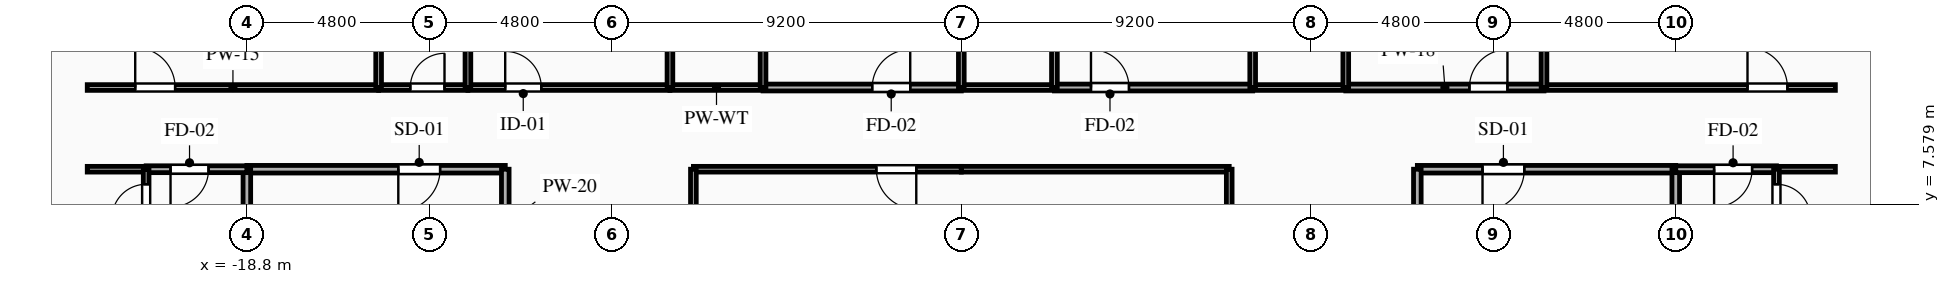
"""IFC4 building model, lengths in metres.
Left out: names, types, materials, properties, quantities, classifications, styles, units other than length and angle.
Written with IfcOpenShell. Run it as: python <this file> out.ifc"""

import sys

from ifc_helpers import new_model, si_unit, direction, frame, frame_2d, origin, place, context, subcontext, project, spatial, rectangle, extrude, element, fill, save


model = new_model("IFC4")
c1 = context("Model", 3, precision=1e-05, world=origin(), true_north=direction((0.0, 1.0)))
c2 = subcontext(c1, "Body", "Model", "MODEL_VIEW")
j1 = project(units=[si_unit("LENGTHUNIT", "METRE"), si_unit("PLANEANGLEUNIT", "RADIAN")], contexts=[c1])
p1 = place(None, origin())
s1 = spatial("IfcSite", under=j1, at=p1, CompositionType="ELEMENT")
p2 = place(p1, origin())
s2 = spatial("IfcBuilding", under=s1, at=p2, CompositionType="ELEMENT")
p3 = place(p2, frame((0.0, 0.0, 50.45)))
s3 = spatial("IfcBuildingStorey", under=s2, at=p3, CompositionType="ELEMENT", Elevation=50.45)
p4 = place(p3, frame((-12.0, 8.5, 0.0), z_axis=(0.0, 0.0, 1.0), x_axis=(-1.0, 0.0, 0.0)))
e1 = element("IfcWall", 1, at=p4, inside=s3, PredefinedType="PARTITIONING", context=c2, shape_type="SweptSolid", body=[
    extrude(rectangle(XDim=6.8, YDim=0.2, at=frame_2d((3.4, 0.0))), origin(), (0.0, 0.0, 1.0), 3.035),
])
p5 = place(p4, frame((1.715, 0.0, 0.0)))
e2 = element("IfcOpeningElement", 2, at=p5, cuts=e1, PredefinedType="OPENING", context=c2, shape_type="SweptSolid", body=[
    extrude(rectangle(XDim=1.1, YDim=2.15, at=frame_2d((0.55, 1.075))), frame((0.0, 0.11, 0.0), z_axis=(0.0, -1.0, 0.0), x_axis=(1.0, 0.0, 0.0)), (0.0, 0.0, 1.0), 0.22),
])
p6 = place(p3, frame((-12.0, 5.6, 0.0), z_axis=(0.0, 0.0, 1.0), x_axis=(0.0, 1.0, 0.0)))
e3 = element("IfcWall", 3, at=p6, inside=s3, PredefinedType="PARTITIONING", context=c2, shape_type="SweptSolid", body=[
    extrude(rectangle(XDim=2.9, YDim=0.2, at=frame_2d((1.45, 0.0))), origin(), (0.0, 0.0, 1.0), 3.035),
])
p7 = place(p3, frame((-18.8, 8.5, 0.0), z_axis=(0.0, 0.0, 1.0), x_axis=(0.0, -1.0, 0.0)))
e4 = element("IfcWall", 4, at=p7, inside=s3, PredefinedType="PARTITIONING", context=c2, shape_type="SweptSolid", body=[
    extrude(rectangle(XDim=2.9, YDim=0.2, at=frame_2d((1.45, 0.0))), origin(), (0.0, 0.0, 1.0), 2.52),
])
p8 = place(p3, frame((18.8, 8.5, 0.0), z_axis=(0.0, 0.0, 1.0), x_axis=(-1.0, 0.0, 0.0)))
e5 = element("IfcWall", 5, at=p8, inside=s3, PredefinedType="PARTITIONING", context=c2, shape_type="SweptSolid", body=[
    extrude(rectangle(XDim=6.8, YDim=0.2, at=frame_2d((3.4, 0.0))), origin(), (0.0, 0.0, 1.0), 3.035),
])
p9 = place(p8, frame((3.985, 0.0, 0.0)))
e6 = element("IfcOpeningElement", 6, at=p9, cuts=e5, PredefinedType="OPENING", context=c2, shape_type="SweptSolid", body=[
    extrude(rectangle(XDim=1.1, YDim=2.15, at=frame_2d((0.55, 1.075))), frame((0.0, 0.11, 0.0), z_axis=(0.0, -1.0, 0.0), x_axis=(1.0, 0.0, 0.0)), (0.0, 0.0, 1.0), 0.22),
])
p10 = place(p3, frame((12.0, 8.5, 0.0), z_axis=(0.0, 0.0, 1.0), x_axis=(0.0, -1.0, 0.0)))
e7 = element("IfcWall", 7, at=p10, inside=s3, PredefinedType="PARTITIONING", context=c2, shape_type="SweptSolid", body=[
    extrude(rectangle(XDim=2.9, YDim=0.2, at=frame_2d((1.45, 0.0))), origin(), (0.0, 0.0, 1.0), 3.035),
])
p11 = place(p3, frame((18.8, 5.6, 0.0), z_axis=(0.0, 0.0, 1.0), x_axis=(0.0, 1.0, 0.0)))
e8 = element("IfcWall", 8, at=p11, inside=s3, PredefinedType="PARTITIONING", context=c2, shape_type="SweptSolid", body=[
    extrude(rectangle(XDim=2.9, YDim=0.2, at=frame_2d((1.45, 0.0))), origin(), (0.0, 0.0, 1.0), 2.52),
])
p12 = place(p3, frame((-18.8, 8.5, 0.0), z_axis=(0.0, 0.0, 1.0), x_axis=(-1.0, 0.0, 0.0)))
e9 = element("IfcWall", 9, at=p12, inside=s3, PredefinedType="PARTITIONING", context=c2, shape_type="SweptSolid", body=[
    extrude(rectangle(XDim=2.65, YDim=0.18, at=frame_2d((1.325, 0.0))), origin(), (0.0, 0.0, 1.0), 3.035),
])
p13 = place(p12, frame((1.009, 0.0, 0.0)))
e10 = element("IfcOpeningElement", 10, at=p13, cuts=e9, PredefinedType="OPENING", context=c2, shape_type="SweptSolid", body=[
    extrude(rectangle(XDim=1.0, YDim=2.15, at=frame_2d((0.5, 1.075))), frame((0.0, 0.1, 0.0), z_axis=(0.0, -1.0, 0.0), x_axis=(1.0, 0.0, 0.0)), (0.0, 0.0, 1.0), 0.2),
])
p14 = place(p3, frame((-21.45, 8.5, 0.0), z_axis=(0.0, 0.0, 1.0), x_axis=(-1.0, 0.0, 0.0)))
e11 = element("IfcWall", 11, at=p14, inside=s3, PredefinedType="PARTITIONING", context=c2, shape_type="SweptSolid", body=[
    extrude(rectangle(XDim=1.55, YDim=0.15, at=frame_2d((0.775, 0.0))), origin(), (0.0, 0.0, 1.0), 3.035),
])
p15 = place(p3, frame((-23.0, 10.65, 0.0), z_axis=(0.0, 0.0, 1.0), x_axis=(1.0, 0.0, 0.0)))
e12 = element("IfcWall", 12, at=p15, inside=s3, PredefinedType="PARTITIONING", context=c2, shape_type="SweptSolid", body=[
    extrude(rectangle(XDim=7.667, YDim=0.15, at=frame_2d((3.833, 0.0))), origin(), (0.0, 0.0, 1.0), 3.035),
])
p16 = place(p15, frame((1.262, 0.0, 0.0)))
e13 = element("IfcOpeningElement", 13, at=p16, cuts=e12, PredefinedType="OPENING", context=c2, shape_type="SweptSolid", body=[
    extrude(rectangle(XDim=1.05, YDim=2.15, at=frame_2d((0.525, 1.075))), frame((0.0, 0.085, 0.0), z_axis=(0.0, -1.0, 0.0), x_axis=(1.0, 0.0, 0.0)), (0.0, 0.0, 1.0), 0.17),
])
p17 = place(p3, frame((-15.333, 10.65, 0.0), z_axis=(0.0, 0.0, 1.0), x_axis=(1.0, 0.0, 0.0)))
e14 = element("IfcWall", 14, at=p17, inside=s3, PredefinedType="PLUMBINGWALL", context=c2, shape_type="SweptSolid", body=[
    extrude(rectangle(XDim=2.35, YDim=0.15, at=frame_2d((1.175, 0.0))), origin(), (0.0, 0.0, 1.0), 3.035),
])
p18 = place(p17, frame((0.834, 0.0, 0.0)))
e15 = element("IfcOpeningElement", 15, at=p18, cuts=e14, PredefinedType="OPENING", context=c2, shape_type="SweptSolid", body=[
    extrude(rectangle(XDim=0.9, YDim=2.1, at=frame_2d((0.45, 1.05))), frame((0.0, 0.085, 0.0), z_axis=(0.0, -1.0, 0.0), x_axis=(1.0, 0.0, 0.0)), (0.0, 0.0, 1.0), 0.17),
])
p19 = place(p3, frame((-12.983, 10.65, 0.0), z_axis=(0.0, 0.0, 1.0), x_axis=(1.0, 0.0, 0.0)))
e16 = element("IfcWall", 16, at=p19, inside=s3, PredefinedType="PARTITIONING", context=c2, shape_type="SweptSolid", body=[
    extrude(rectangle(XDim=5.316, YDim=0.15, at=frame_2d((2.658, 0.0))), origin(), (0.0, 0.0, 1.0), 3.035),
])
p20 = place(p19, frame((0.981, 0.0, 0.0)))
e17 = element("IfcOpeningElement", 17, at=p20, cuts=e16, PredefinedType="OPENING", context=c2, shape_type="SweptSolid", body=[
    extrude(rectangle(XDim=0.95, YDim=2.1, at=frame_2d((0.475, 1.05))), frame((0.0, 0.085, 0.0), z_axis=(0.0, -1.0, 0.0), x_axis=(1.0, 0.0, 0.0)), (0.0, 0.0, 1.0), 0.17),
])
p21 = place(p3, frame((-5.217, 10.65, 0.0), z_axis=(0.0, 0.0, 1.0), x_axis=(1.0, 0.0, 0.0)))
e18 = element("IfcWall", 18, at=p21, inside=s3, PredefinedType="PARTITIONING", context=c2, shape_type="SweptSolid", body=[
    extrude(rectangle(XDim=5.217, YDim=0.18, at=frame_2d((2.608, 0.0))), origin(), (0.0, 0.0, 1.0), 3.035),
])
p22 = place(p21, frame((2.873, 0.0, 0.0)))
e19 = element("IfcOpeningElement", 19, at=p22, cuts=e18, PredefinedType="OPENING", context=c2, shape_type="SweptSolid", body=[
    extrude(rectangle(XDim=1.0, YDim=2.15, at=frame_2d((0.5, 1.075))), frame((0.0, 0.1, 0.0), z_axis=(0.0, -1.0, 0.0), x_axis=(1.0, 0.0, 0.0)), (0.0, 0.0, 1.0), 0.2),
])
p23 = place(p3, frame((-7.667, 10.65, 0.0), z_axis=(0.0, 0.0, 1.0), x_axis=(1.0, 0.0, 0.0)))
e20 = element("IfcWall", 20, at=p23, inside=s3, PredefinedType="PLUMBINGWALL", context=c2, shape_type="SweptSolid", body=[
    extrude(rectangle(XDim=2.45, YDim=0.15, at=frame_2d((1.225, 0.0))), origin(), (0.0, 0.0, 1.0), 3.035),
])
p24 = place(p3, frame((0.0, 8.5, 0.0), z_axis=(0.0, 0.0, 1.0), x_axis=(-1.0, 0.0, 0.0)))
e21 = element("IfcWall", 21, at=p24, inside=s3, PredefinedType="PARTITIONING", context=c2, shape_type="SweptSolid", body=[
    extrude(rectangle(XDim=7.05, YDim=0.15, at=frame_2d((3.525, 0.0))), origin(), (0.0, 0.0, 1.0), 3.035),
])
p25 = place(p24, frame((1.185, 0.0, 0.0)))
e22 = element("IfcOpeningElement", 22, at=p25, cuts=e21, PredefinedType="OPENING", context=c2, shape_type="SweptSolid", body=[
    extrude(rectangle(XDim=1.05, YDim=2.15, at=frame_2d((0.525, 1.075))), frame((0.0, 0.085, 0.0), z_axis=(0.0, -1.0, 0.0), x_axis=(1.0, 0.0, 0.0)), (0.0, 0.0, 1.0), 0.17),
])
p26 = place(p3, frame((21.45, 8.5, 0.0), z_axis=(0.0, 0.0, 1.0), x_axis=(-1.0, 0.0, 0.0)))
e23 = element("IfcWall", 23, at=p26, inside=s3, PredefinedType="PARTITIONING", context=c2, shape_type="SweptSolid", body=[
    extrude(rectangle(XDim=2.65, YDim=0.18, at=frame_2d((1.325, 0.0))), origin(), (0.0, 0.0, 1.0), 3.035),
])
p27 = place(p26, frame((0.641, 0.0, 0.0)))
e24 = element("IfcOpeningElement", 24, at=p27, cuts=e23, PredefinedType="OPENING", context=c2, shape_type="SweptSolid", body=[
    extrude(rectangle(XDim=1.0, YDim=2.15, at=frame_2d((0.5, 1.075))), frame((0.0, 0.1, 0.0), z_axis=(0.0, -1.0, 0.0), x_axis=(1.0, 0.0, 0.0)), (0.0, 0.0, 1.0), 0.2),
])
p28 = place(p3, frame((23.0, 8.5, 0.0), z_axis=(0.0, 0.0, 1.0), x_axis=(-1.0, 0.0, 0.0)))
e25 = element("IfcWall", 25, at=p28, inside=s3, PredefinedType="PARTITIONING", context=c2, shape_type="SweptSolid", body=[
    extrude(rectangle(XDim=1.55, YDim=0.15, at=frame_2d((0.775, 0.0))), origin(), (0.0, 0.0, 1.0), 3.035),
])
p29 = place(p3, frame((2.45, 10.65, 0.0), z_axis=(0.0, 0.0, 1.0), x_axis=(1.0, 0.0, 0.0)))
e26 = element("IfcWall", 26, at=p29, inside=s3, PredefinedType="PARTITIONING", context=c2, shape_type="SweptSolid", body=[
    extrude(rectangle(XDim=5.217, YDim=0.18, at=frame_2d((2.608, 0.0))), origin(), (0.0, 0.0, 1.0), 3.035),
])
p30 = place(p29, frame((0.962, 0.0, 0.0)))
e27 = element("IfcOpeningElement", 27, at=p30, cuts=e26, PredefinedType="OPENING", context=c2, shape_type="SweptSolid", body=[
    extrude(rectangle(XDim=1.0, YDim=2.15, at=frame_2d((0.5, 1.075))), frame((0.0, 0.1, 0.0), z_axis=(0.0, -1.0, 0.0), x_axis=(1.0, 0.0, 0.0)), (0.0, 0.0, 1.0), 0.2),
])
p31 = place(p3, frame((0.0, 10.65, 0.0), z_axis=(0.0, 0.0, 1.0), x_axis=(1.0, 0.0, 0.0)))
e28 = element("IfcWall", 28, at=p31, inside=s3, PredefinedType="PLUMBINGWALL", context=c2, shape_type="SweptSolid", body=[
    extrude(rectangle(XDim=2.45, YDim=0.15, at=frame_2d((1.225, 0.0))), origin(), (0.0, 0.0, 1.0), 3.035),
])
p32 = place(p3, frame((10.117, 10.65, 0.0), z_axis=(0.0, 0.0, 1.0), x_axis=(1.0, 0.0, 0.0)))
e29 = element("IfcWall", 29, at=p32, inside=s3, PredefinedType="PARTITIONING", context=c2, shape_type="SweptSolid", body=[
    extrude(rectangle(XDim=5.216, YDim=0.18, at=frame_2d((2.608, 0.0))), origin(), (0.0, 0.0, 1.0), 3.035),
])
p33 = place(p32, frame((3.254, 0.0, 0.0)))
e30 = element("IfcOpeningElement", 30, at=p33, cuts=e29, PredefinedType="OPENING", context=c2, shape_type="SweptSolid", body=[
    extrude(rectangle(XDim=1.0, YDim=2.15, at=frame_2d((0.5, 1.075))), frame((0.0, 0.1, 0.0), z_axis=(0.0, -1.0, 0.0), x_axis=(1.0, 0.0, 0.0)), (0.0, 0.0, 1.0), 0.2),
])
p34 = place(p3, frame((7.667, 10.65, 0.0), z_axis=(0.0, 0.0, 1.0), x_axis=(1.0, 0.0, 0.0)))
e31 = element("IfcWall", 31, at=p34, inside=s3, PredefinedType="PLUMBINGWALL", context=c2, shape_type="SweptSolid", body=[
    extrude(rectangle(XDim=2.45, YDim=0.15, at=frame_2d((1.225, 0.0))), origin(), (0.0, 0.0, 1.0), 3.035),
])
p35 = place(p3, frame((15.333, 10.65, 0.0), z_axis=(0.0, 0.0, 1.0), x_axis=(1.0, 0.0, 0.0)))
e32 = element("IfcWall", 32, at=p35, inside=s3, PredefinedType="PARTITIONING", context=c2, shape_type="SweptSolid", body=[
    extrude(rectangle(XDim=7.667, YDim=0.15, at=frame_2d((3.833, 0.0))), origin(), (0.0, 0.0, 1.0), 3.035),
])
p36 = place(p35, frame((5.355, 0.0, 0.0)))
e33 = element("IfcOpeningElement", 33, at=p36, cuts=e32, PredefinedType="OPENING", context=c2, shape_type="SweptSolid", body=[
    extrude(rectangle(XDim=1.05, YDim=2.15, at=frame_2d((0.525, 1.075))), frame((0.0, 0.085, 0.0), z_axis=(0.0, -1.0, 0.0), x_axis=(1.0, 0.0, 0.0)), (0.0, 0.0, 1.0), 0.17),
])
for number, where, z_axis, x_axis in (
    (34, (7.05, 8.5, 0.0), (0.0, 0.0, 1.0), (-1.0, 0.0, 0.0)),
    (35, (-7.05, 8.5, 0.0), (0.0, 0.0, 1.0), (0.0, -1.0, 0.0)),
    (36, (7.05, 1.45, 0.0), (0.0, 0.0, 1.0), (0.0, 1.0, 0.0)),
):
    element("IfcWall", number, at=place(p3, frame(where, z_axis=z_axis, x_axis=x_axis)), inside=s3, PredefinedType="PARTITIONING", context=c2, shape_type="SweptSolid", body=[
        extrude(rectangle(XDim=7.05, YDim=0.15, at=frame_2d((3.525, 0.0))), origin(), (0.0, 0.0, 1.0), 3.035),
    ])
p37 = place(p3, frame((-21.45, 6.808, 0.0), z_axis=(0.0, 0.0, 1.0), x_axis=(0.0, 1.0, 0.0)))
e37 = element("IfcWall", 37, at=p37, inside=s3, PredefinedType="PARTITIONING", context=c2, shape_type="SweptSolid", body=[
    extrude(rectangle(XDim=1.692, YDim=0.15, at=frame_2d((0.846, 0.0))), origin(), (0.0, 0.0, 1.0), 3.035),
])
p38 = place(p37, frame((0.396, 0.0, 0.0)))
e38 = element("IfcOpeningElement", 38, at=p38, cuts=e37, PredefinedType="OPENING", context=c2, shape_type="SweptSolid", body=[
    extrude(rectangle(XDim=0.9, YDim=2.1, at=frame_2d((0.45, 1.05))), frame((0.0, 0.085, 0.0), z_axis=(0.0, -1.0, 0.0), x_axis=(1.0, 0.0, 0.0)), (0.0, 0.0, 1.0), 0.17),
])
p39 = place(p3, frame((21.45, 8.5, 0.0), z_axis=(0.0, 0.0, 1.0), x_axis=(0.0, -1.0, 0.0)))
e39 = element("IfcWall", 39, at=p39, inside=s3, PredefinedType="PARTITIONING", context=c2, shape_type="SweptSolid", body=[
    extrude(rectangle(XDim=1.692, YDim=0.15, at=frame_2d((0.846, 0.0))), origin(), (0.0, 0.0, 1.0), 3.035),
])
p40 = place(p39, frame((0.396, 0.0, 0.0)))
e40 = element("IfcOpeningElement", 40, at=p40, cuts=e39, PredefinedType="OPENING", context=c2, shape_type="SweptSolid", body=[
    extrude(rectangle(XDim=0.9, YDim=2.1, at=frame_2d((0.45, 1.05))), frame((0.0, 0.085, 0.0), z_axis=(0.0, -1.0, 0.0), x_axis=(1.0, 0.0, 0.0)), (0.0, 0.0, 1.0), 0.17),
])
for number, where, z_axis, x_axis in (
    (41, (-15.333, 19.4, 0.0), (0.0, 0.0, 1.0), (0.0, -1.0, 0.0)),
    (42, (-12.983, 19.4, 0.0), (0.0, 0.0, 1.0), (0.0, -1.0, 0.0)),
):
    element("IfcWall", number, at=place(p3, frame(where, z_axis=z_axis, x_axis=x_axis)), inside=s3, PredefinedType="PLUMBINGWALL", context=c2, shape_type="SweptSolid", body=[
        extrude(rectangle(XDim=8.75, YDim=0.15, at=frame_2d((4.375, 0.0))), origin(), (0.0, 0.0, 1.0), 3.035),
    ])
for number, where, z_axis, x_axis in (
    (43, (-7.667, 12.8, 0.0), (0.0, 0.0, 1.0), (0.0, -1.0, 0.0)),
    (44, (-5.217, 10.65, 0.0), (0.0, 0.0, 1.0), (0.0, 1.0, 0.0)),
    (45, (0.0, 12.8, 0.0), (0.0, 0.0, 1.0), (0.0, -1.0, 0.0)),
    (46, (2.45, 10.65, 0.0), (0.0, 0.0, 1.0), (0.0, 1.0, 0.0)),
    (47, (7.667, 12.8, 0.0), (0.0, 0.0, 1.0), (0.0, -1.0, 0.0)),
    (48, (10.117, 10.65, 0.0), (0.0, 0.0, 1.0), (0.0, 1.0, 0.0)),
):
    element("IfcWall", number, at=place(p3, frame(where, z_axis=z_axis, x_axis=x_axis)), inside=s3, PredefinedType="PLUMBINGWALL", context=c2, shape_type="SweptSolid", body=[
        extrude(rectangle(XDim=2.15, YDim=0.15, at=frame_2d((1.075, 0.0))), origin(), (0.0, 0.0, 1.0), 3.035),
    ])
p41 = place(p3, frame((15.333, 19.4, 0.0), z_axis=(0.0, 0.0, 1.0), x_axis=(0.0, -1.0, 0.0)))
e49 = element("IfcWall", 49, at=p41, inside=s3, PredefinedType="PARTITIONING", context=c2, shape_type="SweptSolid", body=[
    extrude(rectangle(XDim=8.75, YDim=0.15, at=frame_2d((4.375, 0.0))), origin(), (0.0, 0.0, 1.0), 3.035),
])
p42 = place(p5, origin())
e50 = element("IfcDoor", 50, at=p42, inside=s3, OperationType="SINGLE_SWING_RIGHT", PredefinedType="DOOR", context=c2, shape_type="SweptSolid", body=[
    extrude(rectangle(XDim=1.1, YDim=2.15, at=frame_2d((0.55, 1.075))), frame((0.0, 0.025, 0.0), z_axis=(0.0, -1.0, 0.0), x_axis=(1.0, 0.0, 0.0)), (0.0, 0.0, 1.0), 0.05),
])
fill(e2, e50)
p43 = place(p9, origin())
e51 = element("IfcDoor", 51, at=p43, inside=s3, OperationType="SINGLE_SWING_RIGHT", PredefinedType="DOOR", context=c2, shape_type="SweptSolid", body=[
    extrude(rectangle(XDim=1.1, YDim=2.15, at=frame_2d((0.55, 1.075))), frame((0.0, 0.025, 0.0), z_axis=(0.0, -1.0, 0.0), x_axis=(1.0, 0.0, 0.0)), (0.0, 0.0, 1.0), 0.05),
])
fill(e6, e51)
p44 = place(p13, origin())
e52 = element("IfcDoor", 52, at=p44, inside=s3, OperationType="SINGLE_SWING_RIGHT", PredefinedType="DOOR", context=c2, shape_type="SweptSolid", body=[
    extrude(rectangle(XDim=1.0, YDim=2.15, at=frame_2d((0.5, 1.075))), frame((0.0, 0.025, 0.0), z_axis=(0.0, -1.0, 0.0), x_axis=(1.0, 0.0, 0.0)), (0.0, 0.0, 1.0), 0.05),
])
fill(e10, e52)
p45 = place(p16, origin())
e53 = element("IfcDoor", 53, at=p45, inside=s3, OperationType="SINGLE_SWING_LEFT", PredefinedType="DOOR", context=c2, shape_type="SweptSolid", body=[
    extrude(rectangle(XDim=1.05, YDim=2.15, at=frame_2d((0.525, 1.075))), frame((0.0, 0.025, 0.0), z_axis=(0.0, -1.0, 0.0), x_axis=(1.0, 0.0, 0.0)), (0.0, 0.0, 1.0), 0.05),
])
fill(e13, e53)
p46 = place(p18, origin())
e54 = element("IfcDoor", 54, at=p46, inside=s3, OperationType="SINGLE_SWING_RIGHT", PredefinedType="DOOR", context=c2, shape_type="SweptSolid", body=[
    extrude(rectangle(XDim=0.9, YDim=2.1, at=frame_2d((0.45, 1.05))), frame((0.0, 0.025, 0.0), z_axis=(0.0, -1.0, 0.0), x_axis=(1.0, 0.0, 0.0)), (0.0, 0.0, 1.0), 0.05),
])
fill(e15, e54)
p47 = place(p20, origin())
e55 = element("IfcDoor", 55, at=p47, inside=s3, OperationType="SINGLE_SWING_LEFT", PredefinedType="DOOR", context=c2, shape_type="SweptSolid", body=[
    extrude(rectangle(XDim=0.95, YDim=2.1, at=frame_2d((0.475, 1.05))), frame((0.0, 0.025, 0.0), z_axis=(0.0, -1.0, 0.0), x_axis=(1.0, 0.0, 0.0)), (0.0, 0.0, 1.0), 0.05),
])
fill(e17, e55)
p48 = place(p22, origin())
e56 = element("IfcDoor", 56, at=p48, inside=s3, OperationType="SINGLE_SWING_RIGHT", PredefinedType="DOOR", context=c2, shape_type="SweptSolid", body=[
    extrude(rectangle(XDim=1.0, YDim=2.15, at=frame_2d((0.5, 1.075))), frame((0.0, 0.025, 0.0), z_axis=(0.0, -1.0, 0.0), x_axis=(1.0, 0.0, 0.0)), (0.0, 0.0, 1.0), 0.05),
])
fill(e19, e56)
p49 = place(p25, origin())
e57 = element("IfcDoor", 57, at=p49, inside=s3, OperationType="SINGLE_SWING_LEFT", PredefinedType="DOOR", context=c2, shape_type="SweptSolid", body=[
    extrude(rectangle(XDim=1.05, YDim=2.15, at=frame_2d((0.525, 1.075))), frame((0.0, 0.025, 0.0), z_axis=(0.0, -1.0, 0.0), x_axis=(1.0, 0.0, 0.0)), (0.0, 0.0, 1.0), 0.05),
])
fill(e22, e57)
p50 = place(p27, origin())
e58 = element("IfcDoor", 58, at=p50, inside=s3, OperationType="SINGLE_SWING_RIGHT", PredefinedType="DOOR", context=c2, shape_type="SweptSolid", body=[
    extrude(rectangle(XDim=1.0, YDim=2.15, at=frame_2d((0.5, 1.075))), frame((0.0, 0.025, 0.0), z_axis=(0.0, -1.0, 0.0), x_axis=(1.0, 0.0, 0.0)), (0.0, 0.0, 1.0), 0.05),
])
fill(e24, e58)
p51 = place(p30, origin())
e59 = element("IfcDoor", 59, at=p51, inside=s3, OperationType="SINGLE_SWING_LEFT", PredefinedType="DOOR", context=c2, shape_type="SweptSolid", body=[
    extrude(rectangle(XDim=1.0, YDim=2.15, at=frame_2d((0.5, 1.075))), frame((0.0, 0.025, 0.0), z_axis=(0.0, -1.0, 0.0), x_axis=(1.0, 0.0, 0.0)), (0.0, 0.0, 1.0), 0.05),
])
fill(e27, e59)
p52 = place(p33, origin())
e60 = element("IfcDoor", 60, at=p52, inside=s3, OperationType="SINGLE_SWING_RIGHT", PredefinedType="DOOR", context=c2, shape_type="SweptSolid", body=[
    extrude(rectangle(XDim=1.0, YDim=2.15, at=frame_2d((0.5, 1.075))), frame((0.0, 0.025, 0.0), z_axis=(0.0, -1.0, 0.0), x_axis=(1.0, 0.0, 0.0)), (0.0, 0.0, 1.0), 0.05),
])
fill(e30, e60)
p53 = place(p36, origin())
e61 = element("IfcDoor", 61, at=p53, inside=s3, OperationType="SINGLE_SWING_LEFT", PredefinedType="DOOR", context=c2, shape_type="SweptSolid", body=[
    extrude(rectangle(XDim=1.05, YDim=2.15, at=frame_2d((0.525, 1.075))), frame((0.0, 0.025, 0.0), z_axis=(0.0, -1.0, 0.0), x_axis=(1.0, 0.0, 0.0)), (0.0, 0.0, 1.0), 0.05),
])
fill(e33, e61)
p54 = place(p38, origin())
e62 = element("IfcDoor", 62, at=p54, inside=s3, OperationType="SINGLE_SWING_LEFT", PredefinedType="DOOR", context=c2, shape_type="SweptSolid", body=[
    extrude(rectangle(XDim=0.9, YDim=2.1, at=frame_2d((0.45, 1.05))), frame((0.0, 0.025, 0.0), z_axis=(0.0, -1.0, 0.0), x_axis=(1.0, 0.0, 0.0)), (0.0, 0.0, 1.0), 0.05),
])
fill(e38, e62)
p55 = place(p40, origin())
e63 = element("IfcDoor", 63, at=p55, inside=s3, OperationType="SINGLE_SWING_RIGHT", PredefinedType="DOOR", context=c2, shape_type="SweptSolid", body=[
    extrude(rectangle(XDim=0.9, YDim=2.1, at=frame_2d((0.45, 1.05))), frame((0.0, 0.025, 0.0), z_axis=(0.0, -1.0, 0.0), x_axis=(1.0, 0.0, 0.0)), (0.0, 0.0, 1.0), 0.05),
])
fill(e40, e63)
save(model, sys.argv[1])
